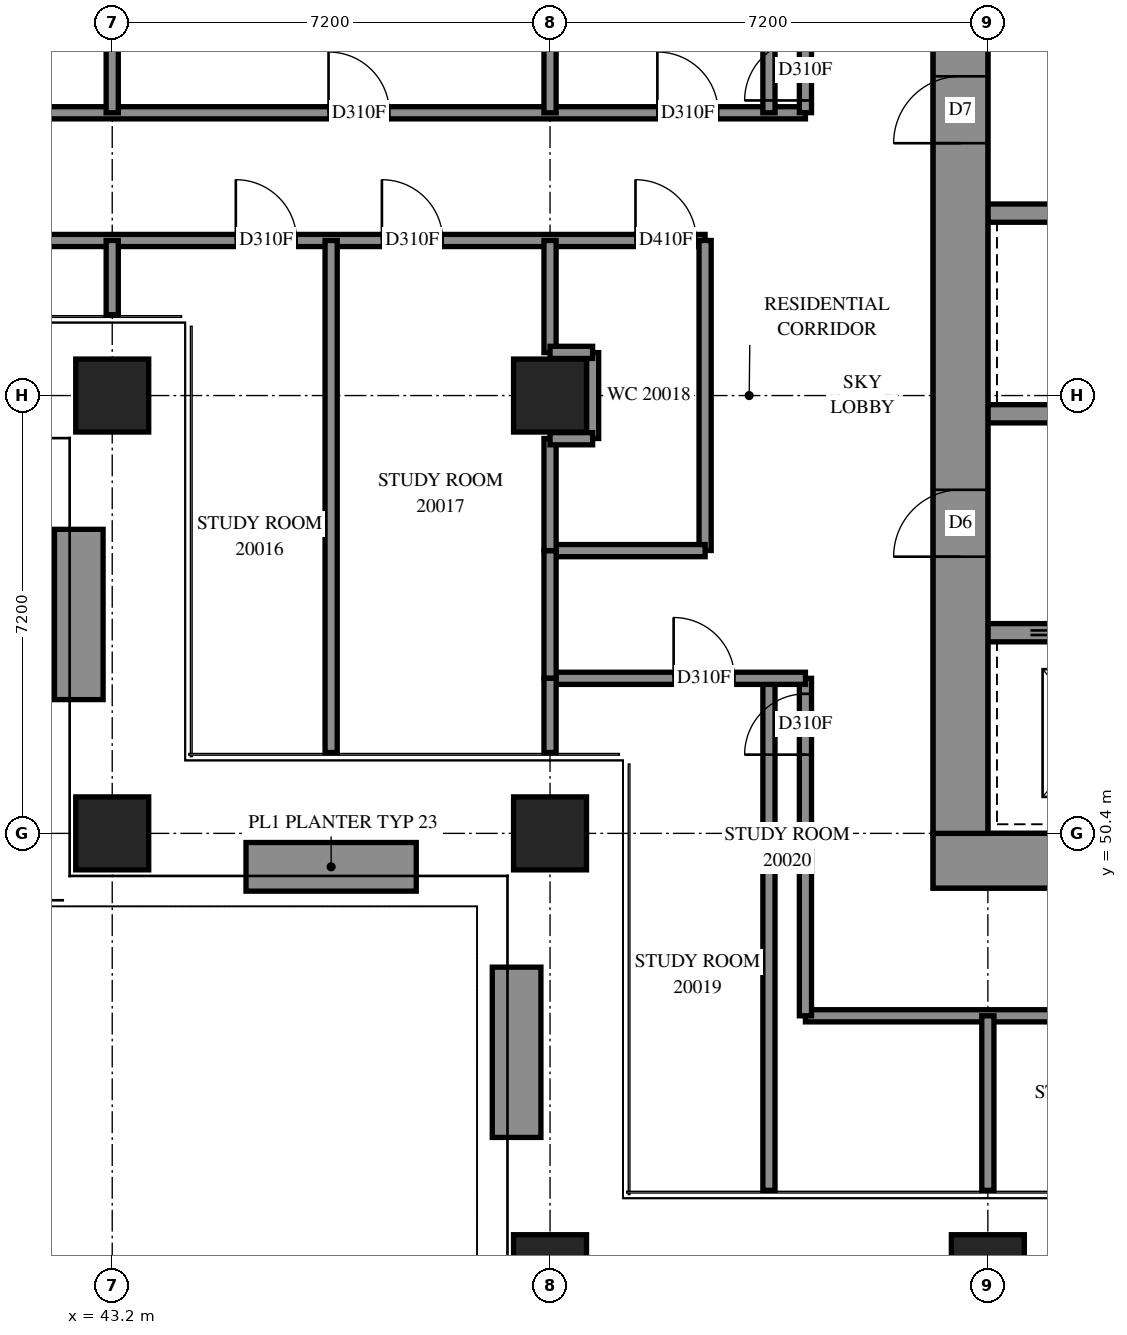
"""IFC4 building model, lengths in metres.
Left out: names, types, materials, properties, quantities, classifications, styles, units other than length and angle.
Written with IfcOpenShell. Run it as: python <this file> out.ifc"""

import sys

from ifc_helpers import new_model, si_unit, direction, frame, frame_2d, origin, origin_2d, place, context, subcontext, project, spatial, rectangle, extrude, element, fill, save


model = new_model("IFC4")
c1 = context("Model", 3, precision=1e-05, world=origin(), true_north=direction((0.0, 1.0)))
c2 = subcontext(c1, "Body", "Model", "MODEL_VIEW")
j1 = project(units=[si_unit("LENGTHUNIT", "METRE"), si_unit("PLANEANGLEUNIT", "RADIAN")], contexts=[c1])
p1 = place(None, origin())
s1 = spatial("IfcSite", under=j1, at=p1, CompositionType="ELEMENT")
p2 = place(p1, origin())
s2 = spatial("IfcBuilding", under=s1, at=p2, CompositionType="ELEMENT")
p3 = place(p2, frame((0.0, 0.0, 77.0)))
s3 = spatial("IfcBuildingStorey", under=s2, at=p3, CompositionType="ELEMENT", Elevation=77.0)
for number, where, z_axis, x_axis in (
    (1, (43.2, 50.4, 0.0), (0.0, 0.0, 1.0), (1.0, 0.0, 0.0)),
    (2, (43.2, 57.6, 0.0), (0.0, 0.0, 1.0), (1.0, 0.0, 0.0)),
    (3, (50.4, 43.2, 0.0), (0.0, 0.0, 1.0), (1.0, 0.0, 0.0)),
    (4, (50.4, 50.4, 0.0), (0.0, 0.0, 1.0), (1.0, 0.0, 0.0)),
    (5, (50.4, 57.6, 0.0), (0.0, 0.0, 1.0), (1.0, 0.0, 0.0)),
    (6, (57.6, 43.2, 0.0), (0.0, 0.0, 1.0), (1.0, 0.0, 0.0)),
):
    element("IfcColumn", number, at=place(p3, frame(where, z_axis=z_axis, x_axis=x_axis)), inside=s3, PredefinedType="COLUMN", context=c2, shape_type="SweptSolid", body=[
        extrude(rectangle(XDim=1.2, YDim=1.2, at=origin_2d()), origin(), (0.0, 0.0, 1.0), 3.9),
    ])
p4 = place(p3, frame((56.7, 49.95, -0.3), z_axis=(0.0, 0.0, 1.0), x_axis=(1.0, 0.0, 0.0)))
e7 = element("IfcWall", 7, at=p4, inside=s3, PredefinedType="SHEAR", context=c2, shape_type="SweptSolid", body=[
    extrude(rectangle(XDim=16.2, YDim=0.9, at=frame_2d((8.1, 0.0))), origin(), (0.0, 0.0, 1.0), 3.5),
])
p5 = place(p3, frame((57.15, 50.4, -0.3), z_axis=(0.0, 0.0, 1.0), x_axis=(0.0, 1.0, 0.0)))
e8 = element("IfcWall", 8, at=p5, inside=s3, PredefinedType="SHEAR", context=c2, shape_type="SweptSolid", body=[
    extrude(rectangle(XDim=14.4, YDim=0.9, at=frame_2d((7.2, 0.0))), origin(), (0.0, 0.0, 1.0), 3.5),
])
p6 = place(p5, frame((4.55, 0.0, 0.3)))
e9 = element("IfcOpeningElement", 9, at=p6, cuts=e8, PredefinedType="OPENING", context=c2, shape_type="SweptSolid", body=[
    extrude(rectangle(XDim=1.1, YDim=2.1, at=frame_2d((0.55, 1.05))), frame((0.0, 0.46, 0.0), z_axis=(0.0, -1.0, 0.0), x_axis=(1.0, 0.0, 0.0)), (0.0, 0.0, 1.0), 0.92),
])
p7 = place(p5, frame((11.35, 0.0, 0.3)))
e10 = element("IfcOpeningElement", 10, at=p7, cuts=e8, PredefinedType="OPENING", context=c2, shape_type="SweptSolid", body=[
    extrude(rectangle(XDim=1.1, YDim=2.1, at=frame_2d((0.55, 1.05))), frame((0.0, 0.46, 0.0), z_axis=(0.0, -1.0, 0.0), x_axis=(1.0, 0.0, 0.0)), (0.0, 0.0, 1.0), 0.92),
])
p8 = place(p3, frame((57.6, 53.7, 0.0), z_axis=(0.0, 0.0, 1.0), x_axis=(1.0, 0.0, 0.0)))
e11 = element("IfcWall", 11, at=p8, inside=s3, PredefinedType="SOLIDWALL", context=c2, shape_type="SweptSolid", body=[
    extrude(rectangle(XDim=14.4, YDim=0.3, at=frame_2d((7.2, 0.0))), origin(), (0.0, 0.0, 1.0), 3.9),
])
p9 = place(p8, frame((1.25, 0.0, 0.0)))
e12 = element("IfcOpeningElement", 12, at=p9, cuts=e11, PredefinedType="OPENING", context=c2, shape_type="SweptSolid", body=[
    extrude(rectangle(XDim=1.1, YDim=2.1, at=frame_2d((0.55, 1.05))), frame((0.0, 0.16, 0.0), z_axis=(0.0, -1.0, 0.0), x_axis=(1.0, 0.0, 0.0)), (0.0, 0.0, 1.0), 0.32),
])
p10 = place(p8, frame((4.85, 0.0, 0.0)))
e13 = element("IfcOpeningElement", 13, at=p10, cuts=e11, PredefinedType="OPENING", context=c2, shape_type="SweptSolid", body=[
    extrude(rectangle(XDim=1.1, YDim=2.1, at=frame_2d((0.55, 1.05))), frame((0.0, 0.16, 0.0), z_axis=(0.0, -1.0, 0.0), x_axis=(1.0, 0.0, 0.0)), (0.0, 0.0, 1.0), 0.32),
])
p11 = place(p8, frame((8.45, 0.0, 0.0)))
e14 = element("IfcOpeningElement", 14, at=p11, cuts=e11, PredefinedType="OPENING", context=c2, shape_type="SweptSolid", body=[
    extrude(rectangle(XDim=1.1, YDim=2.1, at=frame_2d((0.55, 1.05))), frame((0.0, 0.16, 0.0), z_axis=(0.0, -1.0, 0.0), x_axis=(1.0, 0.0, 0.0)), (0.0, 0.0, 1.0), 0.32),
])
p12 = place(p8, frame((12.05, 0.0, 0.0)))
e15 = element("IfcOpeningElement", 15, at=p12, cuts=e11, PredefinedType="OPENING", context=c2, shape_type="SweptSolid", body=[
    extrude(rectangle(XDim=1.1, YDim=2.1, at=frame_2d((0.55, 1.05))), frame((0.0, 0.16, 0.0), z_axis=(0.0, -1.0, 0.0), x_axis=(1.0, 0.0, 0.0)), (0.0, 0.0, 1.0), 0.32),
])
p13 = place(p3, frame((57.6, 57.3, 0.0), z_axis=(0.0, 0.0, 1.0), x_axis=(1.0, 0.0, 0.0)))
e16 = element("IfcWall", 16, at=p13, inside=s3, PredefinedType="SOLIDWALL", context=c2, shape_type="SweptSolid", body=[
    extrude(rectangle(XDim=14.4, YDim=0.3, at=frame_2d((7.2, 0.0))), origin(), (0.0, 0.0, 1.0), 3.9),
])
p14 = place(p13, frame((12.05, 0.0, 0.0)))
e17 = element("IfcOpeningElement", 17, at=p14, cuts=e16, PredefinedType="OPENING", context=c2, shape_type="SweptSolid", body=[
    extrude(rectangle(XDim=1.1, YDim=2.1, at=frame_2d((0.55, 1.05))), frame((0.0, 0.16, 0.0), z_axis=(0.0, -1.0, 0.0), x_axis=(1.0, 0.0, 0.0)), (0.0, 0.0, 1.0), 0.32),
])
p15 = place(p3, frame((57.6, 60.6, 0.0), z_axis=(0.0, 0.0, 1.0), x_axis=(1.0, 0.0, 0.0)))
e18 = element("IfcWall", 18, at=p15, inside=s3, PredefinedType="SOLIDWALL", context=c2, shape_type="SweptSolid", body=[
    extrude(rectangle(XDim=7.2, YDim=0.3, at=frame_2d((3.6, 0.0))), origin(), (0.0, 0.0, 1.0), 3.9),
])
for number, where, z_axis, x_axis in (
    (19, (42.65, 55.4, 0.0), (0.0, 0.0, 1.0), (0.0, -1.0, 0.0)),
    (20, (45.4, 49.85, 0.0), (0.0, 0.0, 1.0), (1.0, 0.0, 0.0)),
    (21, (49.85, 48.2, 0.0), (0.0, 0.0, 1.0), (0.0, -1.0, 0.0)),
):
    element("IfcWall", number, at=place(p3, frame(where, z_axis=z_axis, x_axis=x_axis)), inside=s3, PredefinedType="SOLIDWALL", context=c2, shape_type="SweptSolid", body=[
        extrude(rectangle(XDim=2.8, YDim=0.8, at=frame_2d((1.4, 0.0))), origin(), (0.0, 0.0, 1.0), 0.65),
    ])
p16 = place(p3, frame((30.6, 60.15, 0.0), z_axis=(0.0, 0.0, 1.0), x_axis=(1.0, 0.0, 0.0)))
e22 = element("IfcWall", 22, at=p16, inside=s3, PredefinedType="PARTITIONING", context=c2, shape_type="SweptSolid", body=[
    extrude(rectangle(XDim=22.35, YDim=0.2, at=frame_2d((11.175, 0.0))), origin(), (0.0, 0.0, 1.0), 3.9),
])
p17 = place(p16, frame((6.254, 0.0, 0.0)))
e23 = element("IfcOpeningElement", 23, at=p17, cuts=e22, PredefinedType="OPENING", context=c2, shape_type="SweptSolid", body=[
    extrude(rectangle(XDim=1.0, YDim=2.1, at=frame_2d((0.5, 1.05))), frame((0.0, 0.11, 0.0), z_axis=(0.0, -1.0, 0.0), x_axis=(1.0, 0.0, 0.0)), (0.0, 0.0, 1.0), 0.22),
])
p18 = place(p16, frame((14.633, 0.0, 0.0)))
e24 = element("IfcOpeningElement", 24, at=p18, cuts=e22, PredefinedType="OPENING", context=c2, shape_type="SweptSolid", body=[
    extrude(rectangle(XDim=1.0, YDim=2.1, at=frame_2d((0.5, 1.05))), frame((0.0, 0.11, 0.0), z_axis=(0.0, -1.0, 0.0), x_axis=(1.0, 0.0, 0.0)), (0.0, 0.0, 1.0), 0.22),
])
p19 = place(p16, frame((17.035, 0.0, 0.0)))
e25 = element("IfcOpeningElement", 25, at=p19, cuts=e22, PredefinedType="OPENING", context=c2, shape_type="SweptSolid", body=[
    extrude(rectangle(XDim=1.0, YDim=2.1, at=frame_2d((0.5, 1.05))), frame((0.0, 0.11, 0.0), z_axis=(0.0, -1.0, 0.0), x_axis=(1.0, 0.0, 0.0)), (0.0, 0.0, 1.0), 0.22),
])
p20 = place(p16, frame((21.205, 0.0, 0.0)))
e26 = element("IfcOpeningElement", 26, at=p20, cuts=e22, PredefinedType="OPENING", context=c2, shape_type="SweptSolid", body=[
    extrude(rectangle(XDim=1.0, YDim=2.1, at=frame_2d((0.5, 1.05))), frame((0.0, 0.11, 0.0), z_axis=(0.0, -1.0, 0.0), x_axis=(1.0, 0.0, 0.0)), (0.0, 0.0, 1.0), 0.22),
])
p21 = place(p3, frame((33.452, 62.25, 0.0), z_axis=(0.0, 0.0, 1.0), x_axis=(1.0, 0.0, 0.0)))
e27 = element("IfcWall", 27, at=p21, inside=s3, PredefinedType="PARTITIONING", context=c2, shape_type="SweptSolid", body=[
    extrude(rectangle(XDim=21.148, YDim=0.2, at=frame_2d((10.574, 0.0))), origin(), (0.0, 0.0, 1.0), 3.9),
])
p22 = place(p21, frame((6.106, 0.0, 0.0)))
e28 = element("IfcOpeningElement", 28, at=p22, cuts=e27, PredefinedType="OPENING", context=c2, shape_type="SweptSolid", body=[
    extrude(rectangle(XDim=1.0, YDim=2.1, at=frame_2d((0.5, 1.05))), frame((0.0, 0.11, 0.0), z_axis=(0.0, -1.0, 0.0), x_axis=(1.0, 0.0, 0.0)), (0.0, 0.0, 1.0), 0.22),
])
p23 = place(p21, frame((13.306, 0.0, 0.0)))
e29 = element("IfcOpeningElement", 29, at=p23, cuts=e27, PredefinedType="OPENING", context=c2, shape_type="SweptSolid", body=[
    extrude(rectangle(XDim=1.0, YDim=2.1, at=frame_2d((0.5, 1.05))), frame((0.0, 0.11, 0.0), z_axis=(0.0, -1.0, 0.0), x_axis=(1.0, 0.0, 0.0)), (0.0, 0.0, 1.0), 0.22),
])
p24 = place(p21, frame((18.713, 0.0, 0.0)))
e30 = element("IfcOpeningElement", 30, at=p24, cuts=e27, PredefinedType="OPENING", context=c2, shape_type="SweptSolid", body=[
    extrude(rectangle(XDim=1.0, YDim=2.1, at=frame_2d((0.5, 1.05))), frame((0.0, 0.11, 0.0), z_axis=(0.0, -1.0, 0.0), x_axis=(1.0, 0.0, 0.0)), (0.0, 0.0, 1.0), 0.22),
])
p25 = place(p3, frame((54.6, 47.4, 0.0), z_axis=(0.0, 0.0, 1.0), x_axis=(1.0, 0.0, 0.0)))
e31 = element("IfcWall", 31, at=p25, inside=s3, PredefinedType="PARTITIONING", context=c2, shape_type="SweptSolid", body=[
    extrude(rectangle(XDim=19.502, YDim=0.2, at=frame_2d((9.751, 0.0))), origin(), (0.0, 0.0, 1.0), 3.9),
])
p26 = place(p25, frame((5.032, 0.0, 0.0)))
e32 = element("IfcOpeningElement", 32, at=p26, cuts=e31, PredefinedType="OPENING", context=c2, shape_type="SweptSolid", body=[
    extrude(rectangle(XDim=1.0, YDim=2.1, at=frame_2d((0.5, 1.05))), frame((0.0, 0.11, 0.0), z_axis=(0.0, -1.0, 0.0), x_axis=(1.0, 0.0, 0.0)), (0.0, 0.0, 1.0), 0.22),
])
p27 = place(p25, frame((7.107, 0.0, 0.0)))
e33 = element("IfcOpeningElement", 33, at=p27, cuts=e31, PredefinedType="OPENING", context=c2, shape_type="SweptSolid", body=[
    extrude(rectangle(XDim=1.0, YDim=2.1, at=frame_2d((0.5, 1.05))), frame((0.0, 0.11, 0.0), z_axis=(0.0, -1.0, 0.0), x_axis=(1.0, 0.0, 0.0)), (0.0, 0.0, 1.0), 0.22),
])
p28 = place(p25, frame((12.232, 0.0, 0.0)))
e34 = element("IfcOpeningElement", 34, at=p28, cuts=e31, PredefinedType="OPENING", context=c2, shape_type="SweptSolid", body=[
    extrude(rectangle(XDim=1.0, YDim=2.1, at=frame_2d((0.5, 1.05))), frame((0.0, 0.11, 0.0), z_axis=(0.0, -1.0, 0.0), x_axis=(1.0, 0.0, 0.0)), (0.0, 0.0, 1.0), 0.22),
])
p29 = place(p25, frame((14.307, 0.0, 0.0)))
e35 = element("IfcOpeningElement", 35, at=p29, cuts=e31, PredefinedType="OPENING", context=c2, shape_type="SweptSolid", body=[
    extrude(rectangle(XDim=1.0, YDim=2.1, at=frame_2d((0.5, 1.05))), frame((0.0, 0.11, 0.0), z_axis=(0.0, -1.0, 0.0), x_axis=(1.0, 0.0, 0.0)), (0.0, 0.0, 1.0), 0.22),
])
for number, where, z_axis, x_axis in (
    (36, (46.8, 51.73, 0.0), (0.0, 0.0, 1.0), (0.0, 1.0, 0.0)),
    (37, (54.0, 44.53, 0.0), (0.0, 0.0, 1.0), (0.0, 1.0, 0.0)),
    (38, (54.0, 62.25, 0.0), (0.0, 0.0, 1.0), (0.0, 1.0, 0.0)),
):
    element("IfcWall", number, at=place(p3, frame(where, z_axis=z_axis, x_axis=x_axis)), inside=s3, PredefinedType="PARTITIONING", context=c2, shape_type="SweptSolid", body=[
        extrude(rectangle(XDim=8.42, YDim=0.2, at=frame_2d((4.21, 0.0))), origin(), (0.0, 0.0, 1.0), 3.9),
    ])
p30 = place(p3, frame((54.6, 47.4, 0.0), z_axis=(0.0, 0.0, 1.0), x_axis=(0.0, 1.0, 0.0)))
e39 = element("IfcWall", 39, at=p30, inside=s3, PredefinedType="PARTITIONING", context=c2, shape_type="SweptSolid", body=[
    extrude(rectangle(XDim=5.55, YDim=0.2, at=frame_2d((2.775, 0.0))), origin(), (0.0, 0.0, 1.0), 3.9),
])
p31 = place(p30, frame((4.295, 0.0, 0.0)))
e40 = element("IfcOpeningElement", 40, at=p31, cuts=e39, PredefinedType="OPENING", context=c2, shape_type="SweptSolid", body=[
    extrude(rectangle(XDim=1.0, YDim=2.1, at=frame_2d((0.5, 1.05))), frame((0.0, 0.11, 0.0), z_axis=(0.0, -1.0, 0.0), x_axis=(1.0, 0.0, 0.0)), (0.0, 0.0, 1.0), 0.22),
])
p32 = place(p3, frame((54.6, 62.252, 0.0), z_axis=(0.0, 0.0, 1.0), x_axis=(0.0, 1.0, 0.0)))
e41 = element("IfcWall", 41, at=p32, inside=s3, PredefinedType="PARTITIONING", context=c2, shape_type="SweptSolid", body=[
    extrude(rectangle(XDim=5.548, YDim=0.2, at=frame_2d((2.774, 0.0))), origin(), (0.0, 0.0, 1.0), 3.9),
])
p33 = place(p32, frame((0.201, 0.0, 0.0)))
e42 = element("IfcOpeningElement", 42, at=p33, cuts=e41, PredefinedType="OPENING", context=c2, shape_type="SweptSolid", body=[
    extrude(rectangle(XDim=1.0, YDim=2.1, at=frame_2d((0.5, 1.05))), frame((0.0, 0.11, 0.0), z_axis=(0.0, -1.0, 0.0), x_axis=(1.0, 0.0, 0.0)), (0.0, 0.0, 1.0), 0.22),
])
p34 = place(p3, frame((52.95, 55.052, 0.0), z_axis=(0.0, 0.0, 1.0), x_axis=(0.0, 1.0, 0.0)))
e43 = element("IfcWall", 43, at=p34, inside=s3, PredefinedType="PARTITIONING", context=c2, shape_type="SweptSolid", body=[
    extrude(rectangle(XDim=5.098, YDim=0.2, at=frame_2d((2.549, 0.0))), origin(), (0.0, 0.0, 1.0), 3.9),
])
p35 = place(p3, frame((50.4, 52.95, 0.0), z_axis=(0.0, 0.0, 1.0), x_axis=(1.0, 0.0, 0.0)))
e44 = element("IfcWall", 44, at=p35, inside=s3, PredefinedType="PARTITIONING", context=c2, shape_type="SweptSolid", body=[
    extrude(rectangle(XDim=4.2, YDim=0.2, at=frame_2d((2.1, 0.0))), origin(), (0.0, 0.0, 1.0), 3.9),
])
p36 = place(p35, frame((2.033, 0.0, 0.0)))
e45 = element("IfcOpeningElement", 45, at=p36, cuts=e44, PredefinedType="OPENING", context=c2, shape_type="SweptSolid", body=[
    extrude(rectangle(XDim=1.0, YDim=2.1, at=frame_2d((0.5, 1.05))), frame((0.0, 0.11, 0.0), z_axis=(0.0, -1.0, 0.0), x_axis=(1.0, 0.0, 0.0)), (0.0, 0.0, 1.0), 0.22),
])
p37 = place(p3, frame((57.6, 44.53, 0.0), z_axis=(0.0, 0.0, 1.0), x_axis=(0.0, 1.0, 0.0)))
e46 = element("IfcWall", 46, at=p37, inside=s3, PredefinedType="PARTITIONING", context=c2, shape_type="SweptSolid", body=[
    extrude(rectangle(XDim=2.87, YDim=0.2, at=frame_2d((1.435, 0.0))), origin(), (0.0, 0.0, 1.0), 3.9),
])
p38 = place(p3, frame((50.4, 55.05, 0.0), z_axis=(0.0, 0.0, 1.0), x_axis=(1.0, 0.0, 0.0)))
e47 = element("IfcWall", 47, at=p38, inside=s3, PredefinedType="PARTITIONING", context=c2, shape_type="SweptSolid", body=[
    extrude(rectangle(XDim=2.55, YDim=0.2, at=frame_2d((1.275, 0.0))), origin(), (0.0, 0.0, 1.0), 3.9),
])
p39 = place(p3, frame((50.4, 52.95, 0.0), z_axis=(0.0, 0.0, 1.0), x_axis=(0.0, 1.0, 0.0)))
e48 = element("IfcWall", 48, at=p39, inside=s3, PredefinedType="PARTITIONING", context=c2, shape_type="SweptSolid", body=[
    extrude(rectangle(XDim=2.1, YDim=0.2, at=frame_2d((1.05, 0.0))), origin(), (0.0, 0.0, 1.0), 3.9),
])
for number, where, z_axis, x_axis in (
    (49, (43.2, 62.25, 0.0), (0.0, 0.0, 1.0), (0.0, 1.0, 0.0)),
    (50, (50.4, 62.25, 0.0), (0.0, 0.0, 1.0), (0.0, 1.0, 0.0)),
):
    element("IfcWall", number, at=place(p3, frame(where, z_axis=z_axis, x_axis=x_axis)), inside=s3, PredefinedType="PARTITIONING", context=c2, shape_type="SweptSolid", body=[
        extrude(rectangle(XDim=1.846, YDim=0.2, at=frame_2d((0.923, 0.0))), origin(), (0.0, 0.0, 1.0), 3.9),
    ])
for number, where, z_axis, x_axis in (
    (51, (50.4, 55.05, 0.0), (0.0, 0.0, 1.0), (0.0, 1.0, 0.0)),
    (52, (50.4, 58.306, 0.0), (0.0, 0.0, 1.0), (0.0, 1.0, 0.0)),
):
    element("IfcWall", number, at=place(p3, frame(where, z_axis=z_axis, x_axis=x_axis)), inside=s3, PredefinedType="PARTITIONING", context=c2, shape_type="SweptSolid", body=[
        extrude(rectangle(XDim=1.844, YDim=0.2, at=frame_2d((0.922, 0.0))), origin(), (0.0, 0.0, 1.0), 3.9),
    ])
p40 = place(p3, frame((51.1, 56.894, 0.0), z_axis=(0.0, 0.0, 1.0), x_axis=(0.0, 1.0, 0.0)))
e53 = element("IfcWall", 53, at=p40, inside=s3, PredefinedType="PARTITIONING", context=c2, shape_type="SweptSolid", body=[
    extrude(rectangle(XDim=1.412, YDim=0.2, at=frame_2d((0.706, 0.0))), origin(), (0.0, 0.0, 1.0), 3.9),
])
for number, where, z_axis, x_axis in (
    (54, (50.4, 51.73, 0.0), (0.0, 0.0, 1.0), (0.0, 1.0, 0.0)),
    (55, (43.2, 58.93, 0.0), (0.0, 0.0, 1.0), (0.0, 1.0, 0.0)),
):
    element("IfcWall", number, at=place(p3, frame(where, z_axis=z_axis, x_axis=x_axis)), inside=s3, PredefinedType="PARTITIONING", context=c2, shape_type="SweptSolid", body=[
        extrude(rectangle(XDim=1.22, YDim=0.2, at=frame_2d((0.61, 0.0))), origin(), (0.0, 0.0, 1.0), 3.9),
    ])
for number, where, z_axis, x_axis in (
    (56, (50.4, 58.31, 0.0), (0.0, 0.0, 1.0), (1.0, 0.0, 0.0)),
    (57, (50.4, 56.89, 0.0), (0.0, 0.0, 1.0), (1.0, 0.0, 0.0)),
):
    element("IfcWall", number, at=place(p3, frame(where, z_axis=z_axis, x_axis=x_axis)), inside=s3, PredefinedType="PARTITIONING", context=c2, shape_type="SweptSolid", body=[
        extrude(rectangle(XDim=0.7, YDim=0.2, at=frame_2d((0.35, 0.0))), origin(), (0.0, 0.0, 1.0), 3.9),
    ])
p41 = place(p6, origin())
e58 = element("IfcDoor", 58, at=p41, inside=s3, OperationType="DOUBLE_DOOR_SINGLE_SWING", PredefinedType="DOOR", context=c2, shape_type="SweptSolid", body=[
    extrude(rectangle(XDim=1.1, YDim=2.1, at=frame_2d((0.55, 1.05))), frame((0.0, 0.025, 0.0), z_axis=(0.0, -1.0, 0.0), x_axis=(1.0, 0.0, 0.0)), (0.0, 0.0, 1.0), 0.05),
])
fill(e9, e58)
p42 = place(p7, origin())
e59 = element("IfcDoor", 59, at=p42, inside=s3, OperationType="SINGLE_SWING_LEFT", PredefinedType="DOOR", context=c2, shape_type="SweptSolid", body=[
    extrude(rectangle(XDim=1.1, YDim=2.1, at=frame_2d((0.55, 1.05))), frame((0.0, 0.025, 0.0), z_axis=(0.0, -1.0, 0.0), x_axis=(1.0, 0.0, 0.0)), (0.0, 0.0, 1.0), 0.05),
])
fill(e10, e59)
p43 = place(p18, origin())
e60 = element("IfcDoor", 60, at=p43, inside=s3, OperationType="SINGLE_SWING_LEFT", PredefinedType="DOOR", context=c2, shape_type="SweptSolid", body=[
    extrude(rectangle(XDim=1.0, YDim=2.1, at=frame_2d((0.5, 1.05))), frame((0.0, 0.025, 0.0), z_axis=(0.0, -1.0, 0.0), x_axis=(1.0, 0.0, 0.0)), (0.0, 0.0, 1.0), 0.05),
])
fill(e24, e60)
p44 = place(p19, origin())
e61 = element("IfcDoor", 61, at=p44, inside=s3, OperationType="SINGLE_SWING_RIGHT", PredefinedType="DOOR", context=c2, shape_type="SweptSolid", body=[
    extrude(rectangle(XDim=1.0, YDim=2.1, at=frame_2d((0.5, 1.05))), frame((0.0, 0.025, 0.0), z_axis=(0.0, -1.0, 0.0), x_axis=(1.0, 0.0, 0.0)), (0.0, 0.0, 1.0), 0.05),
])
fill(e25, e61)
p45 = place(p20, origin())
e62 = element("IfcDoor", 62, at=p45, inside=s3, OperationType="SINGLE_SWING_LEFT", PredefinedType="DOOR", context=c2, shape_type="SweptSolid", body=[
    extrude(rectangle(XDim=1.0, YDim=2.1, at=frame_2d((0.5, 1.05))), frame((0.0, 0.025, 0.0), z_axis=(0.0, -1.0, 0.0), x_axis=(1.0, 0.0, 0.0)), (0.0, 0.0, 1.0), 0.05),
])
fill(e26, e62)
p46 = place(p36, origin())
e63 = element("IfcDoor", 63, at=p46, inside=s3, OperationType="SINGLE_SWING_LEFT", PredefinedType="DOOR", context=c2, shape_type="SweptSolid", body=[
    extrude(rectangle(XDim=1.0, YDim=2.1, at=frame_2d((0.5, 1.05))), frame((0.0, 0.025, 0.0), z_axis=(0.0, -1.0, 0.0), x_axis=(1.0, 0.0, 0.0)), (0.0, 0.0, 1.0), 0.05),
])
fill(e45, e63)
p47 = place(p31, origin())
e64 = element("IfcDoor", 64, at=p47, inside=s3, OperationType="SINGLE_SWING_RIGHT", PredefinedType="DOOR", context=c2, shape_type="SweptSolid", body=[
    extrude(rectangle(XDim=1.0, YDim=2.1, at=frame_2d((0.5, 1.05))), frame((0.0, 0.025, 0.0), z_axis=(0.0, -1.0, 0.0), x_axis=(1.0, 0.0, 0.0)), (0.0, 0.0, 1.0), 0.05),
])
fill(e40, e64)
p48 = place(p23, origin())
e65 = element("IfcDoor", 65, at=p48, inside=s3, OperationType="SINGLE_SWING_RIGHT", PredefinedType="DOOR", context=c2, shape_type="SweptSolid", body=[
    extrude(rectangle(XDim=1.0, YDim=2.1, at=frame_2d((0.5, 1.05))), frame((0.0, 0.025, 0.0), z_axis=(0.0, -1.0, 0.0), x_axis=(1.0, 0.0, 0.0)), (0.0, 0.0, 1.0), 0.05),
])
fill(e29, e65)
p49 = place(p24, origin())
e66 = element("IfcDoor", 66, at=p49, inside=s3, OperationType="SINGLE_SWING_RIGHT", PredefinedType="DOOR", context=c2, shape_type="SweptSolid", body=[
    extrude(rectangle(XDim=1.0, YDim=2.1, at=frame_2d((0.5, 1.05))), frame((0.0, 0.025, 0.0), z_axis=(0.0, -1.0, 0.0), x_axis=(1.0, 0.0, 0.0)), (0.0, 0.0, 1.0), 0.05),
])
fill(e30, e66)
p50 = place(p33, origin())
e67 = element("IfcDoor", 67, at=p50, inside=s3, OperationType="SINGLE_SWING_LEFT", PredefinedType="DOOR", context=c2, shape_type="SweptSolid", body=[
    extrude(rectangle(XDim=1.0, YDim=2.1, at=frame_2d((0.5, 1.05))), frame((0.0, 0.025, 0.0), z_axis=(0.0, -1.0, 0.0), x_axis=(1.0, 0.0, 0.0)), (0.0, 0.0, 1.0), 0.05),
])
fill(e42, e67)
save(model, sys.argv[1])
